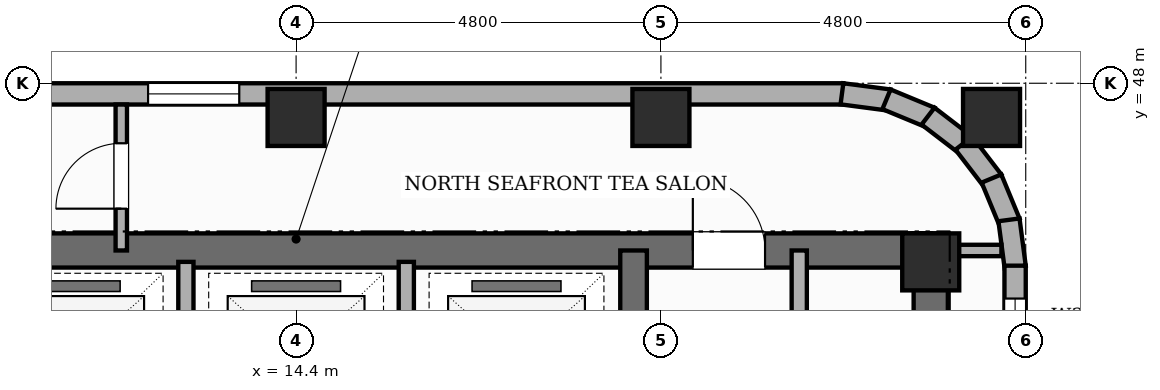
"""IFC4 building model, lengths in metres.
Left out: names, types, materials, properties, quantities, classifications, styles, units other than length and angle.
Written with IfcOpenShell. Run it as: python <this file> out.ifc"""

import sys

from ifc_helpers import new_model, si_unit, direction, frame, frame_2d, origin, origin_2d, place, context, subcontext, project, spatial, rectangle, extrude, element, fill, save


model = new_model("IFC4")
c1 = context("Model", 3, precision=1e-05, world=origin(), true_north=direction((0.0, 1.0)))
c2 = subcontext(c1, "Body", "Model", "MODEL_VIEW")
j1 = project(units=[si_unit("LENGTHUNIT", "METRE"), si_unit("PLANEANGLEUNIT", "RADIAN")], contexts=[c1])
p1 = place(None, origin())
s1 = spatial("IfcSite", under=j1, at=p1, CompositionType="ELEMENT")
p2 = place(p1, origin())
s2 = spatial("IfcBuilding", under=s1, at=p2, CompositionType="ELEMENT")
p3 = place(p2, frame((0.0, 0.0, 278.5)))
s3 = spatial("IfcBuildingStorey", under=s2, at=p3, CompositionType="ELEMENT", Elevation=278.5)
p4 = place(p3, frame((22.75, 30.675, 0.0), z_axis=(0.0, 0.0, 1.0), x_axis=(0.0, 1.0, 0.0)))
e1 = element("IfcWall", 1, at=p4, inside=s3, PredefinedType="SHEAR", context=c2, shape_type="SweptSolid", body=[
    extrude(rectangle(XDim=15.35, YDim=0.45, at=frame_2d((7.675, 0.0))), origin(), (0.0, 0.0, 1.0), 4.3),
])
p5 = place(p4, frame((10.675, 0.0, 0.0)))
e2 = element("IfcOpeningElement", 2, at=p5, cuts=e1, PredefinedType="OPENING", context=c2, shape_type="SweptSolid", body=[
    extrude(rectangle(XDim=1.0, YDim=2.15, at=frame_2d((0.5, 1.075))), frame((0.0, 0.235, 0.0), z_axis=(0.0, -1.0, 0.0), x_axis=(1.0, 0.0, 0.0)), (0.0, 0.0, 1.0), 0.47),
])
p6 = place(p3, frame((6.05, 45.8, 0.0), z_axis=(0.0, 0.0, 1.0), x_axis=(1.0, 0.0, 0.0)))
e3 = element("IfcWall", 3, at=p6, inside=s3, PredefinedType="SHEAR", context=c2, shape_type="SweptSolid", body=[
    extrude(rectangle(XDim=16.7, YDim=0.45, at=frame_2d((8.35, 0.0))), origin(), (0.0, 0.0, 1.0), 4.3),
])
p7 = place(p6, frame((13.57, 0.0, 0.0)))
e4 = element("IfcOpeningElement", 4, at=p7, cuts=e3, PredefinedType="OPENING", context=c2, shape_type="SweptSolid", body=[
    extrude(rectangle(XDim=0.95, YDim=2.15, at=frame_2d((0.475, 1.075))), frame((0.0, 0.235, 0.0), z_axis=(0.0, -1.0, 0.0), x_axis=(1.0, 0.0, 0.0)), (0.0, 0.0, 1.0), 0.47),
])
p8 = place(p3, frame((18.84, 30.9, 0.0), z_axis=(0.0, 0.0, 1.0), x_axis=(0.0, 1.0, 0.0)))
e5 = element("IfcWall", 5, at=p8, inside=s3, PredefinedType="SHEAR", context=c2, shape_type="SweptSolid", body=[
    extrude(rectangle(XDim=14.9, YDim=0.35, at=frame_2d((7.45, 0.0))), origin(), (0.0, 0.0, 1.0), 4.3),
])
p9 = place(p8, frame((0.65, 0.0, 0.0)))
e6 = element("IfcOpeningElement", 6, at=p9, cuts=e5, PredefinedType="OPENING", context=c2, shape_type="SweptSolid", body=[
    extrude(rectangle(XDim=0.95, YDim=2.1, at=frame_2d((0.475, 1.05))), frame((0.0, 0.185, 0.0), z_axis=(0.0, -1.0, 0.0), x_axis=(1.0, 0.0, 0.0)), (0.0, 0.0, 1.0), 0.37),
])
p10 = place(p8, frame((10.45, 0.0, 0.0)))
e7 = element("IfcOpeningElement", 7, at=p10, cuts=e5, PredefinedType="OPENING", context=c2, shape_type="SweptSolid", body=[
    extrude(rectangle(XDim=1.0, YDim=2.15, at=frame_2d((0.5, 1.075))), frame((0.0, 0.185, 0.0), z_axis=(0.0, -1.0, 0.0), x_axis=(1.0, 0.0, 0.0)), (0.0, 0.0, 1.0), 0.37),
])
for number, where, z_axis, x_axis in (
    (8, (14.4, 47.55, 0.0), (0.0, 0.0, 1.0), (1.0, 0.0, 0.0)),
    (9, (19.2, 47.55, 0.0), (0.0, 0.0, 1.0), (1.0, 0.0, 0.0)),
    (10, (22.75, 45.65, 0.0), (0.0, 0.0, 1.0), (1.0, 0.0, 0.0)),
    (11, (23.55, 47.55, 0.0), (0.0, 0.0, 1.0), (1.0, 0.0, 0.0)),
):
    element("IfcColumn", number, at=place(p3, frame(where, z_axis=z_axis, x_axis=x_axis)), inside=s3, PredefinedType="COLUMN", context=c2, shape_type="SweptSolid", body=[
        extrude(rectangle(XDim=0.75, YDim=0.75, at=origin_2d()), origin(), (0.0, 0.0, 1.0), 4.3),
    ])
p11 = place(p3, frame((7.2, 47.86, 0.0), z_axis=(0.0, 0.0, 1.0), x_axis=(1.0, 0.0, 0.0)))
e12 = element("IfcWall", 12, at=p11, inside=s3, PredefinedType="STANDARD", context=c2, shape_type="SweptSolid", body=[
    extrude(rectangle(XDim=14.4, YDim=0.28, at=frame_2d((7.2, 0.0))), origin(), (0.0, 0.0, 1.0), 3.32),
])
p12 = place(p11, frame((0.433, 0.0, 0.8)))
e13 = element("IfcOpeningElement", 13, at=p12, cuts=e12, PredefinedType="OPENING", context=c2, shape_type="SweptSolid", body=[
    extrude(rectangle(XDim=1.2, YDim=1.8, at=frame_2d((0.6, 0.9))), frame((0.0, 0.15, 0.0), z_axis=(0.0, -1.0, 0.0), x_axis=(1.0, 0.0, 0.0)), (0.0, 0.0, 1.0), 0.3),
])
p13 = place(p11, frame((5.252, 0.0, 0.8)))
e14 = element("IfcOpeningElement", 14, at=p13, cuts=e12, PredefinedType="OPENING", context=c2, shape_type="SweptSolid", body=[
    extrude(rectangle(XDim=1.2, YDim=1.8, at=frame_2d((0.6, 0.9))), frame((0.0, 0.15, 0.0), z_axis=(0.0, -1.0, 0.0), x_axis=(1.0, 0.0, 0.0)), (0.0, 0.0, 1.0), 0.3),
])
for number, where, z_axis, x_axis in (
    (15, (21.582, 47.861, 0.0), (0.0, 0.0, 1.0), (0.991, -0.131, 0.0)),
    (16, (22.167, 47.789, 0.0), (0.0, 0.0, 1.0), (0.924, -0.382, 0.0)),
    (17, (22.715, 47.567, 0.0), (0.0, 0.0, 1.0), (0.793, -0.609, 0.0)),
    (18, (23.186, 47.212, 0.0), (0.0, 0.0, 1.0), (0.609, -0.793, 0.0)),
    (19, (23.549, 46.746, 0.0), (0.0, 0.0, 1.0), (0.382, -0.924, 0.0)),
    (20, (23.779, 46.203, 0.0), (0.0, 0.0, 1.0), (0.131, -0.991, 0.0)),
):
    element("IfcWall", number, at=place(p3, frame(where, z_axis=z_axis, x_axis=x_axis)), inside=s3, PredefinedType="STANDARD", context=c2, shape_type="SweptSolid", body=[
        extrude(rectangle(XDim=0.626, YDim=0.28, at=frame_2d((0.313, 0.0))), origin(), (0.0, 0.0, 1.0), 3.32),
    ])
p14 = place(p3, frame((23.86, 45.6, 0.0), z_axis=(0.0, 0.0, 1.0), x_axis=(0.0, -1.0, 0.0)))
e21 = element("IfcWall", 21, at=p14, inside=s3, PredefinedType="STANDARD", context=c2, shape_type="SweptSolid", body=[
    extrude(rectangle(XDim=32.4, YDim=0.28, at=frame_2d((16.2, 0.0))), origin(), (0.0, 0.0, 1.0), 3.32),
])
p15 = place(p14, frame((28.25, 0.0, 0.0)))
e22 = element("IfcOpeningElement", 22, at=p15, cuts=e21, PredefinedType="OPENING", context=c2, shape_type="SweptSolid", body=[
    extrude(rectangle(XDim=1.1, YDim=2.15, at=frame_2d((0.55, 1.075))), frame((0.0, 0.15, 0.0), z_axis=(0.0, -1.0, 0.0), x_axis=(1.0, 0.0, 0.0)), (0.0, 0.0, 1.0), 0.3),
])
p16 = place(p14, frame((29.752, 0.0, 0.45)))
e23 = element("IfcOpeningElement", 23, at=p16, cuts=e21, PredefinedType="OPENING", context=c2, shape_type="SweptSolid", body=[
    extrude(rectangle(XDim=0.75, YDim=1.8, at=frame_2d((0.375, 0.9))), frame((0.0, 0.15, 0.0), z_axis=(0.0, -1.0, 0.0), x_axis=(1.0, 0.0, 0.0)), (0.0, 0.0, 1.0), 0.3),
])
p17 = place(p14, frame((20.153, 0.0, 0.45)))
e24 = element("IfcOpeningElement", 24, at=p17, cuts=e21, PredefinedType="OPENING", context=c2, shape_type="SweptSolid", body=[
    extrude(rectangle(XDim=0.75, YDim=1.8, at=frame_2d((0.375, 0.9))), frame((0.0, 0.15, 0.0), z_axis=(0.0, -1.0, 0.0), x_axis=(1.0, 0.0, 0.0)), (0.0, 0.0, 1.0), 0.3),
])
p18 = place(p14, frame((0.433, 0.0, 0.8)))
e25 = element("IfcOpeningElement", 25, at=p18, cuts=e21, PredefinedType="OPENING", context=c2, shape_type="SweptSolid", body=[
    extrude(rectangle(XDim=1.2, YDim=1.8, at=frame_2d((0.6, 0.9))), frame((0.0, 0.15, 0.0), z_axis=(0.0, -1.0, 0.0), x_axis=(1.0, 0.0, 0.0)), (0.0, 0.0, 1.0), 0.3),
])
p19 = place(p3, frame((21.02, 43.05, 0.0), z_axis=(0.0, 0.0, 1.0), x_axis=(0.0, 1.0, 0.0)))
e26 = element("IfcWall", 26, at=p19, inside=s3, PredefinedType="POLYGONAL", context=c2, shape_type="SweptSolid", body=[
    extrude(rectangle(XDim=2.75, YDim=0.2, at=frame_2d((1.375, 0.0))), origin(), (0.0, 0.0, 1.0), 4.04),
])
p20 = place(p19, frame((0.7, 0.0, 0.0)))
e27 = element("IfcOpeningElement", 27, at=p20, cuts=e26, PredefinedType="OPENING", context=c2, shape_type="SweptSolid", body=[
    extrude(rectangle(XDim=0.86, YDim=2.1, at=frame_2d((0.43, 1.05))), frame((0.0, 0.11, 0.0), z_axis=(0.0, -1.0, 0.0), x_axis=(1.0, 0.0, 0.0)), (0.0, 0.0, 1.0), 0.22),
])
for number, where, z_axis, x_axis in (
    (28, (12.95, 43.1, 0.0), (0.0, 0.0, 1.0), (0.0, 1.0, 0.0)),
    (29, (15.85, 43.1, 0.0), (0.0, 0.0, 1.0), (0.0, 1.0, 0.0)),
):
    element("IfcWall", number, at=place(p3, frame(where, z_axis=z_axis, x_axis=x_axis)), inside=s3, PredefinedType="POLYGONAL", context=c2, shape_type="SweptSolid", body=[
        extrude(rectangle(XDim=2.55, YDim=0.2, at=frame_2d((1.275, 0.0))), origin(), (0.0, 0.0, 1.0), 4.04),
    ])
p21 = place(p3, frame((22.75, 45.8, 0.0), z_axis=(0.0, 0.0, 1.0), x_axis=(1.0, 0.0, 0.0)))
e30 = element("IfcWall", 30, at=p21, inside=s3, PredefinedType="PARTITIONING", context=c2, shape_type="SweptSolid", body=[
    extrude(rectangle(XDim=0.93, YDim=0.15, at=frame_2d((0.465, 0.0))), origin(), (0.0, 0.0, 1.0), 4.04),
])
p22 = place(p3, frame((12.1, 45.8, 0.0), z_axis=(0.0, 0.0, 1.0), x_axis=(0.0, 1.0, 0.0)))
e31 = element("IfcWall", 31, at=p22, inside=s3, PredefinedType="PARTITIONING", context=c2, shape_type="SweptSolid", body=[
    extrude(rectangle(XDim=1.92, YDim=0.15, at=frame_2d((0.96, 0.0))), origin(), (0.0, 0.0, 1.0), 4.04),
])
p23 = place(p22, frame((0.55, 0.0, 0.0)))
e32 = element("IfcOpeningElement", 32, at=p23, cuts=e31, PredefinedType="OPENING", context=c2, shape_type="SweptSolid", body=[
    extrude(rectangle(XDim=0.86, YDim=2.1, at=frame_2d((0.43, 1.05))), frame((0.0, 0.085, 0.0), z_axis=(0.0, -1.0, 0.0), x_axis=(1.0, 0.0, 0.0)), (0.0, 0.0, 1.0), 0.17),
])
p24 = place(p13, origin())
e33 = element("IfcWindow", 33, at=p24, inside=s3, PartitioningType="SINGLE_PANEL", PredefinedType="WINDOW", context=c2, shape_type="SweptSolid", body=[
    extrude(rectangle(XDim=1.2, YDim=1.8, at=frame_2d((0.6, 0.9))), frame((0.0, 0.03, 0.0), z_axis=(0.0, -1.0, 0.0), x_axis=(1.0, 0.0, 0.0)), (0.0, 0.0, 1.0), 0.06),
])
fill(e14, e33)
p25 = place(p18, origin())
e34 = element("IfcWindow", 34, at=p25, inside=s3, PartitioningType="SINGLE_PANEL", PredefinedType="WINDOW", context=c2, shape_type="SweptSolid", body=[
    extrude(rectangle(XDim=1.2, YDim=1.8, at=frame_2d((0.6, 0.9))), frame((0.0, 0.03, 0.0), z_axis=(0.0, -1.0, 0.0), x_axis=(1.0, 0.0, 0.0)), (0.0, 0.0, 1.0), 0.06),
])
fill(e25, e34)
p26 = place(p7, origin())
e35 = element("IfcDoor", 35, at=p26, inside=s3, OperationType="SINGLE_SWING_LEFT", PredefinedType="DOOR", context=c2, shape_type="SweptSolid", body=[
    extrude(rectangle(XDim=0.95, YDim=2.15, at=frame_2d((0.475, 1.075))), frame((0.0, 0.025, 0.0), z_axis=(0.0, -1.0, 0.0), x_axis=(1.0, 0.0, 0.0)), (0.0, 0.0, 1.0), 0.05),
])
fill(e4, e35)
p27 = place(p23, origin())
e36 = element("IfcDoor", 36, at=p27, inside=s3, OperationType="SINGLE_SWING_LEFT", PredefinedType="DOOR", context=c2, shape_type="SweptSolid", body=[
    extrude(rectangle(XDim=0.86, YDim=2.1, at=frame_2d((0.43, 1.05))), frame((0.0, 0.025, 0.0), z_axis=(0.0, -1.0, 0.0), x_axis=(1.0, 0.0, 0.0)), (0.0, 0.0, 1.0), 0.05),
])
fill(e32, e36)
save(model, sys.argv[1])
